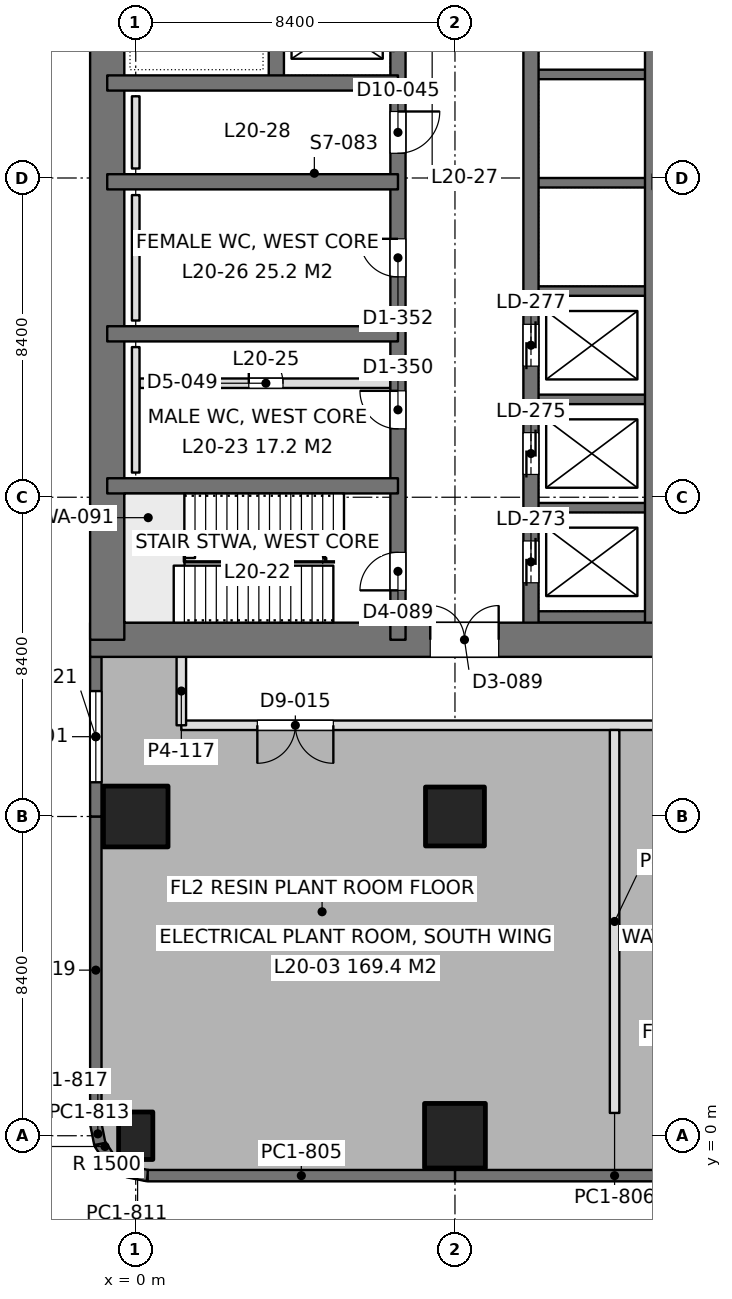
"""IFC4 building model, lengths in metres.
Left out: names, types, materials, properties, quantities, classifications, styles, units other than length and angle.
Written with IfcOpenShell. Run it as: python <this file> out.ifc"""

import sys

from ifc_helpers import new_model, si_unit, direction, frame, frame_2d, origin, origin_with_axes, origin_2d, place, context, subcontext, project, spatial, rectangle, extrude, element, fill, save


model = new_model("IFC4")
c1 = context("Model", 3, precision=1e-05, world=origin(), true_north=direction((0.0, 1.0)))
c2 = subcontext(c1, "Body", "Model", "MODEL_VIEW")
j1 = project(units=[si_unit("LENGTHUNIT", "METRE"), si_unit("PLANEANGLEUNIT", "RADIAN")], contexts=[c1])
p1 = place(None, origin())
s1 = spatial("IfcSite", under=j1, at=p1, CompositionType="ELEMENT")
p2 = place(p1, origin())
s2 = spatial("IfcBuilding", under=s1, at=p2, CompositionType="ELEMENT")
p3 = place(p2, frame((0.0, 0.0, 90.9)))
s3 = spatial("IfcBuildingStorey", under=s2, at=p3, CompositionType="ELEMENT", Elevation=90.9)
p4 = place(p3, origin_with_axes())
e1 = element("IfcColumn", 1, at=p4, inside=s3, PredefinedType="COLUMN", context=c2, shape_type="SweptSolid", body=[
    extrude(rectangle(XDim=0.9, YDim=1.25, at=origin_2d()), origin(), (0.0, 0.0, 1.0), 5.24),
])
p5 = place(p3, frame((0.0, 8.4, 0.0), z_axis=(0.0, 0.0, 1.0), x_axis=(0.0, 1.0, 0.0)))
e2 = element("IfcColumn", 2, at=p5, inside=s3, PredefinedType="COLUMN", context=c2, shape_type="SweptSolid", body=[
    extrude(rectangle(XDim=1.6, YDim=1.7, at=origin_2d()), origin(), (0.0, 0.0, 1.0), 5.4),
])
p6 = place(p3, frame((8.4, 0.0, 0.0), z_axis=(0.0, 0.0, 1.0), x_axis=(1.0, 0.0, 0.0)))
e3 = element("IfcColumn", 3, at=p6, inside=s3, PredefinedType="COLUMN", context=c2, shape_type="SweptSolid", body=[
    extrude(rectangle(XDim=1.6, YDim=1.7, at=origin_2d()), origin(), (0.0, 0.0, 1.0), 5.24),
])
p7 = place(p3, frame((8.4, 8.4, 0.0), z_axis=(0.0, 0.0, 1.0), x_axis=(1.0, 0.0, 0.0)))
e4 = element("IfcColumn", 4, at=p7, inside=s3, PredefinedType="COLUMN", context=c2, shape_type="SweptSolid", body=[
    extrude(rectangle(XDim=1.55, YDim=1.55, at=origin_2d()), origin(), (0.0, 0.0, 1.0), 5.4),
])
p8 = place(p3, frame((-1.2, 13.05, 0.0), z_axis=(0.0, 0.0, 1.0), x_axis=(1.0, 0.0, 0.0)))
e5 = element("IfcWall", 5, at=p8, inside=s3, PredefinedType="SHEAR", context=c2, shape_type="SweptSolid", body=[
    extrude(rectangle(XDim=18.0, YDim=0.9, at=frame_2d((9.0, 0.0))), origin(), (0.0, 0.0, 1.0), 5.4),
])
p9 = place(p8, frame((8.95, 0.0, 0.0)))
e6 = element("IfcOpeningElement", 6, at=p9, cuts=e5, PredefinedType="OPENING", context=c2, shape_type="SweptSolid", body=[
    extrude(rectangle(XDim=1.8, YDim=2.4, at=frame_2d((0.9, 1.2))), frame((0.0, 0.46, 0.0), z_axis=(0.0, -1.0, 0.0), x_axis=(1.0, 0.0, 0.0)), (0.0, 0.0, 1.0), 0.92),
])
p10 = place(p3, frame((-0.75, 13.05, 0.0), z_axis=(0.0, 0.0, 1.0), x_axis=(0.0, 1.0, 0.0)))
e7 = element("IfcWall", 7, at=p10, inside=s3, PredefinedType="SHEAR", context=c2, shape_type="SweptSolid", body=[
    extrude(rectangle(XDim=24.3, YDim=0.9, at=frame_2d((12.15, 0.0))), origin(), (0.0, 0.0, 1.0), 5.4),
])
p11 = place(p3, frame((6.9, 13.05, 0.0), z_axis=(0.0, 0.0, 1.0), x_axis=(0.0, 1.0, 0.0)))
e8 = element("IfcWall", 8, at=p11, inside=s3, PredefinedType="SHEAR", context=c2, shape_type="SweptSolid", body=[
    extrude(rectangle(XDim=24.3, YDim=0.4, at=frame_2d((12.15, 0.0))), origin(), (0.0, 0.0, 1.0), 5.4),
])
p12 = place(p11, frame((1.3, 0.0, 0.0)))
e9 = element("IfcOpeningElement", 9, at=p12, cuts=e8, PredefinedType="OPENING", context=c2, shape_type="SweptSolid", body=[
    extrude(rectangle(XDim=1.0, YDim=2.2, at=frame_2d((0.5, 1.1))), frame((0.0, 0.21, 0.0), z_axis=(0.0, -1.0, 0.0), x_axis=(1.0, 0.0, 0.0)), (0.0, 0.0, 1.0), 0.42),
])
p13 = place(p11, frame((22.0, 0.0, 0.0)))
e10 = element("IfcOpeningElement", 10, at=p13, cuts=e8, PredefinedType="OPENING", context=c2, shape_type="SweptSolid", body=[
    extrude(rectangle(XDim=1.0, YDim=2.2, at=frame_2d((0.5, 1.1))), frame((0.0, 0.21, 0.0), z_axis=(0.0, -1.0, 0.0), x_axis=(1.0, 0.0, 0.0)), (0.0, 0.0, 1.0), 0.42),
])
p14 = place(p11, frame((5.55, 0.0, 0.0)))
e11 = element("IfcOpeningElement", 11, at=p14, cuts=e8, PredefinedType="OPENING", context=c2, shape_type="SweptSolid", body=[
    extrude(rectangle(XDim=1.0, YDim=2.2, at=frame_2d((0.5, 1.1))), frame((0.0, 0.21, 0.0), z_axis=(0.0, -1.0, 0.0), x_axis=(1.0, 0.0, 0.0)), (0.0, 0.0, 1.0), 0.42),
])
p15 = place(p11, frame((9.55, 0.0, 0.0)))
e12 = element("IfcOpeningElement", 12, at=p15, cuts=e8, PredefinedType="OPENING", context=c2, shape_type="SweptSolid", body=[
    extrude(rectangle(XDim=1.0, YDim=2.2, at=frame_2d((0.5, 1.1))), frame((0.0, 0.21, 0.0), z_axis=(0.0, -1.0, 0.0), x_axis=(1.0, 0.0, 0.0)), (0.0, 0.0, 1.0), 0.42),
])
p16 = place(p11, frame((12.8, 0.0, 0.0)))
e13 = element("IfcOpeningElement", 13, at=p16, cuts=e8, PredefinedType="OPENING", context=c2, shape_type="SweptSolid", body=[
    extrude(rectangle(XDim=1.1, YDim=2.2, at=frame_2d((0.55, 1.1))), frame((0.0, 0.21, 0.0), z_axis=(0.0, -1.0, 0.0), x_axis=(1.0, 0.0, 0.0)), (0.0, 0.0, 1.0), 0.42),
])
p17 = place(p11, frame((15.538, 0.0, 0.0)))
e14 = element("IfcOpeningElement", 14, at=p17, cuts=e8, PredefinedType="OPENING", context=c2, shape_type="SweptSolid", body=[
    extrude(rectangle(XDim=1.1, YDim=2.2, at=frame_2d((0.55, 1.1))), frame((0.0, 0.21, 0.0), z_axis=(0.0, -1.0, 0.0), x_axis=(1.0, 0.0, 0.0)), (0.0, 0.0, 1.0), 0.42),
])
p18 = place(p11, frame((18.262, 0.0, 0.0)))
e15 = element("IfcOpeningElement", 15, at=p18, cuts=e8, PredefinedType="OPENING", context=c2, shape_type="SweptSolid", body=[
    extrude(rectangle(XDim=1.1, YDim=2.2, at=frame_2d((0.55, 1.1))), frame((0.0, 0.21, 0.0), z_axis=(0.0, -1.0, 0.0), x_axis=(1.0, 0.0, 0.0)), (0.0, 0.0, 1.0), 0.42),
])
p19 = place(p3, frame((10.4, 13.05, 0.0), z_axis=(0.0, 0.0, 1.0), x_axis=(0.0, 1.0, 0.0)))
e16 = element("IfcWall", 16, at=p19, inside=s3, PredefinedType="SHEAR", context=c2, shape_type="SweptSolid", body=[
    extrude(rectangle(XDim=24.3, YDim=0.4, at=frame_2d((12.15, 0.0))), origin(), (0.0, 0.0, 1.0), 5.4),
])
p20 = place(p19, frame((1.5, 0.0, 0.0)))
e17 = element("IfcOpeningElement", 17, at=p20, cuts=e16, PredefinedType="OPENING", context=c2, shape_type="SweptSolid", body=[
    extrude(rectangle(XDim=1.1, YDim=2.2, at=frame_2d((0.55, 1.1))), frame((0.0, 0.21, 0.0), z_axis=(0.0, -1.0, 0.0), x_axis=(1.0, 0.0, 0.0)), (0.0, 0.0, 1.0), 0.42),
])
p21 = place(p19, frame((4.35, 0.0, 0.0)))
e18 = element("IfcOpeningElement", 18, at=p21, cuts=e16, PredefinedType="OPENING", context=c2, shape_type="SweptSolid", body=[
    extrude(rectangle(XDim=1.1, YDim=2.2, at=frame_2d((0.55, 1.1))), frame((0.0, 0.21, 0.0), z_axis=(0.0, -1.0, 0.0), x_axis=(1.0, 0.0, 0.0)), (0.0, 0.0, 1.0), 0.42),
])
p22 = place(p19, frame((7.2, 0.0, 0.0)))
e19 = element("IfcOpeningElement", 19, at=p22, cuts=e16, PredefinedType="OPENING", context=c2, shape_type="SweptSolid", body=[
    extrude(rectangle(XDim=1.1, YDim=2.2, at=frame_2d((0.55, 1.1))), frame((0.0, 0.21, 0.0), z_axis=(0.0, -1.0, 0.0), x_axis=(1.0, 0.0, 0.0)), (0.0, 0.0, 1.0), 0.42),
])
p23 = place(p19, frame((21.45, 0.0, 0.0)))
e20 = element("IfcOpeningElement", 20, at=p23, cuts=e16, PredefinedType="OPENING", context=c2, shape_type="SweptSolid", body=[
    extrude(rectangle(XDim=1.1, YDim=2.2, at=frame_2d((0.55, 1.1))), frame((0.0, 0.21, 0.0), z_axis=(0.0, -1.0, 0.0), x_axis=(1.0, 0.0, 0.0)), (0.0, 0.0, 1.0), 0.42),
])
p24 = place(p3, frame((13.6, 13.05, 0.0), z_axis=(0.0, 0.0, 1.0), x_axis=(0.0, 1.0, 0.0)))
e21 = element("IfcWall", 21, at=p24, inside=s3, PredefinedType="SHEAR", context=c2, shape_type="SweptSolid", body=[
    extrude(rectangle(XDim=24.3, YDim=0.4, at=frame_2d((12.15, 0.0))), origin(), (0.0, 0.0, 1.0), 5.4),
])
for number, where, z_axis, x_axis in (
    (22, (-0.75, 17.1, 0.0), (0.0, 0.0, 1.0), (1.0, 0.0, 0.0)),
    (23, (-0.75, 21.1, 0.0), (0.0, 0.0, 1.0), (1.0, 0.0, 0.0)),
    (24, (-0.75, 25.1, 0.0), (0.0, 0.0, 1.0), (1.0, 0.0, 0.0)),
    (25, (-0.75, 27.7, 0.0), (0.0, 0.0, 1.0), (1.0, 0.0, 0.0)),
):
    element("IfcWall", number, at=place(p3, frame(where, z_axis=z_axis, x_axis=x_axis)), inside=s3, PredefinedType="SHEAR", context=c2, shape_type="SweptSolid", body=[
        extrude(rectangle(XDim=7.65, YDim=0.4, at=frame_2d((3.825, 0.0))), origin(), (0.0, 0.0, 1.0), 5.4),
    ])
p25 = place(p3, frame((3.7, 27.7, 0.0), z_axis=(0.0, 0.0, 1.0), x_axis=(0.0, 1.0, 0.0)))
e26 = element("IfcWall", 26, at=p25, inside=s3, PredefinedType="SHEAR", context=c2, shape_type="SweptSolid", body=[
    extrude(rectangle(XDim=5.6, YDim=0.4, at=frame_2d((2.8, 0.0))), origin(), (0.0, 0.0, 1.0), 5.4),
])
p26 = place(p3, frame((10.4, 13.65, 0.0), z_axis=(0.0, 0.0, 1.0), x_axis=(1.0, 0.0, 0.0)))
e27 = element("IfcWall", 27, at=p26, inside=s3, PredefinedType="SHEAR", context=c2, shape_type="SweptSolid", body=[
    extrude(rectangle(XDim=3.2, YDim=0.3, at=frame_2d((1.6, 0.0))), origin(), (0.0, 0.0, 1.0), 5.4),
])
for number, where, z_axis, x_axis in (
    (28, (10.4, 16.525, 0.0), (0.0, 0.0, 1.0), (1.0, 0.0, 0.0)),
    (29, (10.4, 19.375, 0.0), (0.0, 0.0, 1.0), (1.0, 0.0, 0.0)),
    (30, (10.4, 22.225, 0.0), (0.0, 0.0, 1.0), (1.0, 0.0, 0.0)),
    (31, (10.4, 25.075, 0.0), (0.0, 0.0, 1.0), (1.0, 0.0, 0.0)),
    (32, (10.4, 27.925, 0.0), (0.0, 0.0, 1.0), (1.0, 0.0, 0.0)),
):
    element("IfcWall", number, at=place(p3, frame(where, z_axis=z_axis, x_axis=x_axis)), inside=s3, PredefinedType="SHEAR", context=c2, shape_type="SweptSolid", body=[
        extrude(rectangle(XDim=3.2, YDim=0.25, at=frame_2d((1.6, 0.0))), origin(), (0.0, 0.0, 1.0), 5.4),
    ])
p27 = place(p3, frame((16.8, -1.05, 0.0), z_axis=(0.0, 0.0, 1.0), x_axis=(-1.0, 0.0, 0.0)))
e33 = element("IfcWall", 33, at=p27, inside=s3, PredefinedType="SOLIDWALL", context=c2, shape_type="SweptSolid", body=[
    extrude(rectangle(XDim=8.4, YDim=0.3, at=frame_2d((4.2, 0.0))), origin(), (0.0, 0.0, 1.0), 5.04),
])
p28 = place(p3, frame((8.4, -1.05, 0.0), z_axis=(0.0, 0.0, 1.0), x_axis=(-1.0, 0.0, 0.0)))
e34 = element("IfcWall", 34, at=p28, inside=s3, PredefinedType="SOLIDWALL", context=c2, shape_type="SweptSolid", body=[
    extrude(rectangle(XDim=8.085, YDim=0.3, at=frame_2d((4.042, 0.0))), origin(), (0.0, 0.0, 1.0), 5.04),
])
p29 = place(p3, frame((0.315, -1.05, 0.0), z_axis=(0.0, 0.0, 1.0), x_axis=(-0.980788534345, 0.195073962632, 0.0)))
e35 = element("IfcWall", 35, at=p29, inside=s3, PredefinedType="SOLIDWALL", context=c2, shape_type="SweptSolid", body=[
    extrude(rectangle(XDim=0.541, YDim=0.3, at=frame_2d((0.271, 0.0))), origin(), (0.0, 0.0, 1.0), 5.04),
])
for number, where, z_axis, x_axis in (
    (36, (-0.216, -0.945, 0.0), (0.0, 0.0, 1.0), (-0.831, 0.556, 0.0)),
    (37, (-0.653, -0.653, 0.0), (0.0, 0.0, 1.0), (-0.556, 0.831, 0.0)),
):
    element("IfcWall", number, at=place(p3, frame(where, z_axis=z_axis, x_axis=x_axis)), inside=s3, PredefinedType="SOLIDWALL", context=c2, shape_type="SweptSolid", body=[
        extrude(rectangle(XDim=0.526, YDim=0.3, at=frame_2d((0.263, 0.0))), origin(), (0.0, 0.0, 1.0), 5.04),
    ])
p30 = place(p3, frame((-0.945, -0.216, 0.0), z_axis=(0.0, 0.0, 1.0), x_axis=(-0.195073962632, 0.980788534345, 0.0)))
e38 = element("IfcWall", 38, at=p30, inside=s3, PredefinedType="SOLIDWALL", context=c2, shape_type="SweptSolid", body=[
    extrude(rectangle(XDim=0.541, YDim=0.3, at=frame_2d((0.271, 0.0))), origin(), (0.0, 0.0, 1.0), 5.04),
])
p31 = place(p3, frame((-1.05, 0.315, 0.0), z_axis=(0.0, 0.0, 1.0), x_axis=(0.0, 1.0, 0.0)))
e39 = element("IfcWall", 39, at=p31, inside=s3, PredefinedType="SOLIDWALL", context=c2, shape_type="SweptSolid", body=[
    extrude(rectangle(XDim=8.085, YDim=0.3, at=frame_2d((4.042, 0.0))), origin(), (0.0, 0.0, 1.0), 5.24),
])
p32 = place(p3, frame((-1.05, 8.4, 0.0), z_axis=(0.0, 0.0, 1.0), x_axis=(0.0, 1.0, 0.0)))
e40 = element("IfcWall", 40, at=p32, inside=s3, PredefinedType="SOLIDWALL", context=c2, shape_type="SweptSolid", body=[
    extrude(rectangle(XDim=4.2, YDim=0.3, at=frame_2d((2.1, 0.0))), origin(), (0.0, 0.0, 1.0), 5.24),
])
p33 = place(p32, frame((0.9, 0.0, 1.2)))
e41 = element("IfcOpeningElement", 41, at=p33, cuts=e40, PredefinedType="OPENING", context=c2, shape_type="SweptSolid", body=[
    extrude(rectangle(XDim=2.4, YDim=2.4, at=frame_2d((1.2, 1.2))), frame((0.0, 0.16, 0.0), z_axis=(0.0, -1.0, 0.0), x_axis=(1.0, 0.0, 0.0)), (0.0, 0.0, 1.0), 0.32),
])
p34 = place(p3, frame((1.2, 10.8, 0.0), z_axis=(0.0, 0.0, 1.0), x_axis=(1.0, 0.0, 0.0)))
e42 = element("IfcWall", 42, at=p34, inside=s3, PredefinedType="PARTITIONING", context=c2, shape_type="SweptSolid", body=[
    extrude(rectangle(XDim=48.0, YDim=0.25, at=frame_2d((24.0, 0.0))), origin(), (0.0, 0.0, 1.0), 4.64),
])
p35 = place(p34, frame((2.0, 0.0, 0.0)))
e43 = element("IfcOpeningElement", 43, at=p35, cuts=e42, PredefinedType="OPENING", context=c2, shape_type="SweptSolid", body=[
    extrude(rectangle(XDim=2.0, YDim=2.4, at=frame_2d((1.0, 1.2))), frame((0.0, 0.135, 0.0), z_axis=(0.0, -1.0, 0.0), x_axis=(1.0, 0.0, 0.0)), (0.0, 0.0, 1.0), 0.27),
])
p36 = place(p34, frame((18.8, 0.0, 0.0)))
e44 = element("IfcOpeningElement", 44, at=p36, cuts=e42, PredefinedType="OPENING", context=c2, shape_type="SweptSolid", body=[
    extrude(rectangle(XDim=2.0, YDim=2.4, at=frame_2d((1.0, 1.2))), frame((0.0, 0.135, 0.0), z_axis=(0.0, -1.0, 0.0), x_axis=(1.0, 0.0, 0.0)), (0.0, 0.0, 1.0), 0.27),
])
p37 = place(p34, frame((27.2, 0.0, 0.0)))
e45 = element("IfcOpeningElement", 45, at=p37, cuts=e42, PredefinedType="OPENING", context=c2, shape_type="SweptSolid", body=[
    extrude(rectangle(XDim=2.0, YDim=2.4, at=frame_2d((1.0, 1.2))), frame((0.0, 0.135, 0.0), z_axis=(0.0, -1.0, 0.0), x_axis=(1.0, 0.0, 0.0)), (0.0, 0.0, 1.0), 0.27),
])
p38 = place(p34, frame((44.0, 0.0, 0.0)))
e46 = element("IfcOpeningElement", 46, at=p38, cuts=e42, PredefinedType="OPENING", context=c2, shape_type="SweptSolid", body=[
    extrude(rectangle(XDim=2.0, YDim=2.4, at=frame_2d((1.0, 1.2))), frame((0.0, 0.135, 0.0), z_axis=(0.0, -1.0, 0.0), x_axis=(1.0, 0.0, 0.0)), (0.0, 0.0, 1.0), 0.27),
])
p39 = place(p3, frame((1.2, 10.8, 0.0), z_axis=(0.0, 0.0, 1.0), x_axis=(0.0, 1.0, 0.0)))
e47 = element("IfcWall", 47, at=p39, inside=s3, PredefinedType="PARTITIONING", context=c2, shape_type="SweptSolid", body=[
    extrude(rectangle(XDim=1.802, YDim=0.25, at=frame_2d((0.901, 0.0))), origin(), (0.0, 0.0, 1.0), 5.24),
])
p40 = place(p3, frame((12.6, 0.6, 0.0), z_axis=(0.0, 0.0, 1.0), x_axis=(0.0, 1.0, 0.0)))
e48 = element("IfcWall", 48, at=p40, inside=s3, PredefinedType="PARTITIONING", context=c2, shape_type="SweptSolid", body=[
    extrude(rectangle(XDim=10.076, YDim=0.25, at=frame_2d((5.038, 0.0))), origin(), (0.0, 0.0, 1.0), 4.64),
])
p41 = place(p3, frame((0.1, 19.8, 0.0), z_axis=(0.0, 0.0, 1.0), x_axis=(1.0, 0.0, 0.0)))
e49 = element("IfcWall", 49, at=p41, inside=s3, PredefinedType="PARTITIONING", context=c2, shape_type="SweptSolid", body=[
    extrude(rectangle(XDim=6.6, YDim=0.25, at=frame_2d((3.3, 0.0))), origin(), (0.0, 0.0, 1.0), 5.2),
])
p42 = place(p41, frame((2.875, 0.0, 0.0)))
e50 = element("IfcOpeningElement", 50, at=p42, cuts=e49, PredefinedType="OPENING", context=c2, shape_type="SweptSolid", body=[
    extrude(rectangle(XDim=0.9, YDim=2.2, at=frame_2d((0.45, 1.1))), frame((0.0, 0.135, 0.0), z_axis=(0.0, -1.0, 0.0), x_axis=(1.0, 0.0, 0.0)), (0.0, 0.0, 1.0), 0.27),
])
for number, where, z_axis, x_axis in (
    (51, (0.0, 17.45, 0.0), (0.0, 0.0, 1.0), (0.0, 1.0, 0.0)),
    (52, (0.0, 21.45, 0.0), (0.0, 0.0, 1.0), (0.0, 1.0, 0.0)),
):
    element("IfcWall", number, at=place(p3, frame(where, z_axis=z_axis, x_axis=x_axis)), inside=s3, PredefinedType="PLUMBINGWALL", context=c2, shape_type="SweptSolid", body=[
        extrude(rectangle(XDim=3.3, YDim=0.2, at=frame_2d((1.65, 0.0))), origin(), (0.0, 0.0, 1.0), 1.2),
    ])
p43 = place(p3, frame((0.0, 25.45, 0.0), z_axis=(0.0, 0.0, 1.0), x_axis=(0.0, 1.0, 0.0)))
e53 = element("IfcWall", 53, at=p43, inside=s3, PredefinedType="PLUMBINGWALL", context=c2, shape_type="SweptSolid", body=[
    extrude(rectangle(XDim=1.9, YDim=0.2, at=frame_2d((0.95, 0.0))), origin(), (0.0, 0.0, 1.0), 1.2),
])
p44 = place(p33, origin())
e54 = element("IfcWindow", 54, at=p44, inside=s3, PartitioningType="SINGLE_PANEL", PredefinedType="USERDEFINED", context=c2, shape_type="SweptSolid", body=[
    extrude(rectangle(XDim=2.4, YDim=2.4, at=frame_2d((1.2, 1.2))), frame((0.0, 0.03, 0.0), z_axis=(0.0, -1.0, 0.0), x_axis=(1.0, 0.0, 0.0)), (0.0, 0.0, 1.0), 0.06),
])
fill(e41, e54)
p45 = place(p9, origin())
e55 = element("IfcDoor", 55, at=p45, inside=s3, OperationType="DOUBLE_DOOR_SINGLE_SWING", PredefinedType="DOOR", context=c2, shape_type="SweptSolid", body=[
    extrude(rectangle(XDim=1.8, YDim=2.4, at=frame_2d((0.9, 1.2))), frame((0.0, 0.025, 0.0), z_axis=(0.0, -1.0, 0.0), x_axis=(1.0, 0.0, 0.0)), (0.0, 0.0, 1.0), 0.05),
])
fill(e6, e55)
p46 = place(p12, origin())
e56 = element("IfcDoor", 56, at=p46, inside=s3, OperationType="SINGLE_SWING_LEFT", PredefinedType="DOOR", context=c2, shape_type="SweptSolid", body=[
    extrude(rectangle(XDim=1.0, YDim=2.2, at=frame_2d((0.5, 1.1))), frame((0.0, 0.025, 0.0), z_axis=(0.0, -1.0, 0.0), x_axis=(1.0, 0.0, 0.0)), (0.0, 0.0, 1.0), 0.05),
])
fill(e9, e56)
p47 = place(p14, origin())
e57 = element("IfcDoor", 57, at=p47, inside=s3, OperationType="SINGLE_SWING_RIGHT", PredefinedType="DOOR", context=c2, shape_type="SweptSolid", body=[
    extrude(rectangle(XDim=1.0, YDim=2.2, at=frame_2d((0.5, 1.1))), frame((0.0, 0.025, 0.0), z_axis=(0.0, -1.0, 0.0), x_axis=(1.0, 0.0, 0.0)), (0.0, 0.0, 1.0), 0.05),
])
fill(e11, e57)
p48 = place(p15, origin())
e58 = element("IfcDoor", 58, at=p48, inside=s3, OperationType="SINGLE_SWING_RIGHT", PredefinedType="DOOR", context=c2, shape_type="SweptSolid", body=[
    extrude(rectangle(XDim=1.0, YDim=2.2, at=frame_2d((0.5, 1.1))), frame((0.0, 0.025, 0.0), z_axis=(0.0, -1.0, 0.0), x_axis=(1.0, 0.0, 0.0)), (0.0, 0.0, 1.0), 0.05),
])
fill(e12, e58)
p49 = place(p16, frame((1.1, 0.0, 0.0), z_axis=(0.0, 0.0, 1.0), x_axis=(-1.0, 0.0, 0.0)))
e59 = element("IfcDoor", 59, at=p49, inside=s3, OperationType="SINGLE_SWING_LEFT", PredefinedType="DOOR", context=c2, shape_type="SweptSolid", body=[
    extrude(rectangle(XDim=1.1, YDim=2.2, at=frame_2d((0.55, 1.1))), frame((0.0, 0.025, 0.0), z_axis=(0.0, -1.0, 0.0), x_axis=(1.0, 0.0, 0.0)), (0.0, 0.0, 1.0), 0.05),
])
fill(e13, e59)
p50 = place(p20, origin())
e60 = element("IfcDoor", 60, at=p50, inside=s3, OperationType="DOUBLE_DOOR_SLIDING", PredefinedType="DOOR", context=c2, shape_type="SweptSolid", body=[
    extrude(rectangle(XDim=1.1, YDim=2.2, at=frame_2d((0.55, 1.1))), frame((0.0, 0.025, 0.0), z_axis=(0.0, -1.0, 0.0), x_axis=(1.0, 0.0, 0.0)), (0.0, 0.0, 1.0), 0.05),
])
fill(e17, e60)
p51 = place(p21, origin())
e61 = element("IfcDoor", 61, at=p51, inside=s3, OperationType="DOUBLE_DOOR_SLIDING", PredefinedType="DOOR", context=c2, shape_type="SweptSolid", body=[
    extrude(rectangle(XDim=1.1, YDim=2.2, at=frame_2d((0.55, 1.1))), frame((0.0, 0.025, 0.0), z_axis=(0.0, -1.0, 0.0), x_axis=(1.0, 0.0, 0.0)), (0.0, 0.0, 1.0), 0.05),
])
fill(e18, e61)
p52 = place(p22, origin())
e62 = element("IfcDoor", 62, at=p52, inside=s3, OperationType="DOUBLE_DOOR_SLIDING", PredefinedType="DOOR", context=c2, shape_type="SweptSolid", body=[
    extrude(rectangle(XDim=1.1, YDim=2.2, at=frame_2d((0.55, 1.1))), frame((0.0, 0.025, 0.0), z_axis=(0.0, -1.0, 0.0), x_axis=(1.0, 0.0, 0.0)), (0.0, 0.0, 1.0), 0.05),
])
fill(e19, e62)
p53 = place(p35, frame((2.0, 0.0, 0.0), z_axis=(0.0, 0.0, 1.0), x_axis=(-1.0, 0.0, 0.0)))
e63 = element("IfcDoor", 63, at=p53, inside=s3, OperationType="DOUBLE_DOOR_SINGLE_SWING", PredefinedType="DOOR", context=c2, shape_type="SweptSolid", body=[
    extrude(rectangle(XDim=2.0, YDim=2.4, at=frame_2d((1.0, 1.2))), frame((0.0, 0.025, 0.0), z_axis=(0.0, -1.0, 0.0), x_axis=(1.0, 0.0, 0.0)), (0.0, 0.0, 1.0), 0.05),
])
fill(e43, e63)
p54 = place(p42, origin())
e64 = element("IfcDoor", 64, at=p54, inside=s3, OperationType="SINGLE_SWING_LEFT", PredefinedType="DOOR", context=c2, shape_type="SweptSolid", body=[
    extrude(rectangle(XDim=0.9, YDim=2.2, at=frame_2d((0.45, 1.1))), frame((0.0, 0.025, 0.0), z_axis=(0.0, -1.0, 0.0), x_axis=(1.0, 0.0, 0.0)), (0.0, 0.0, 1.0), 0.05),
])
fill(e50, e64)
save(model, sys.argv[1])
